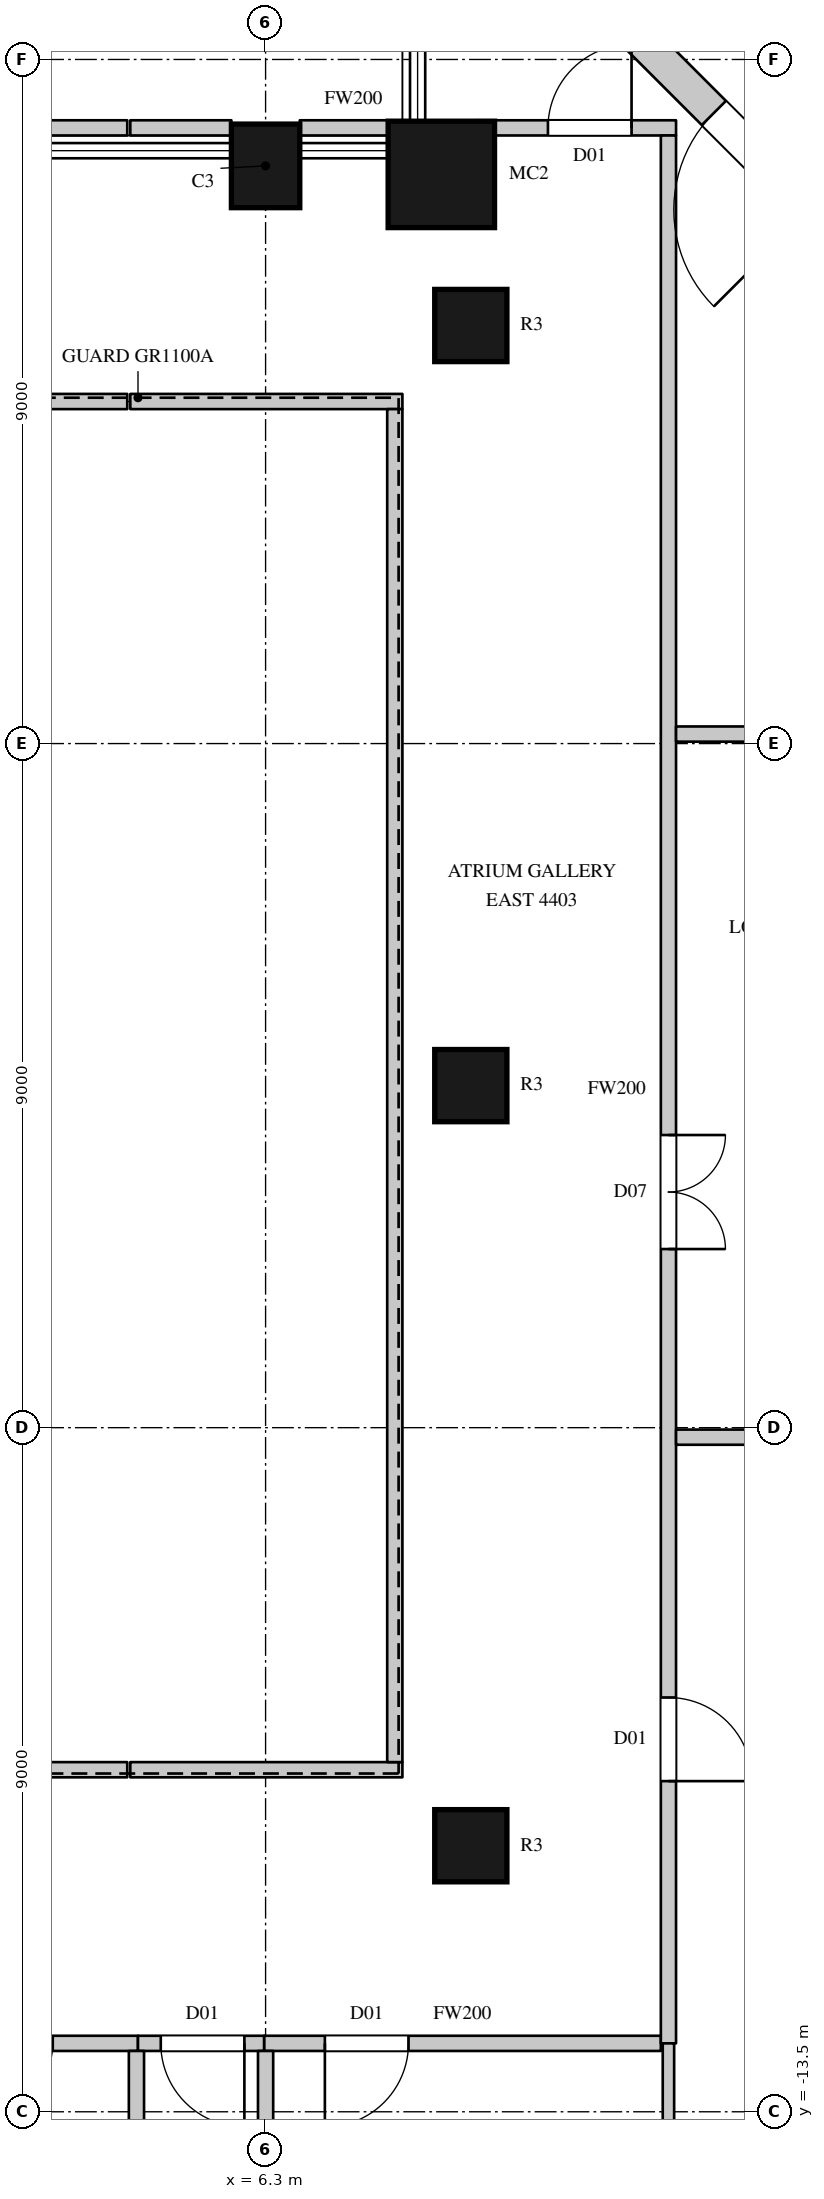
"""IFC4 building model, lengths in metres.
Left out: names, types, materials, properties, quantities, classifications, styles, units other than length and angle.
Written with IfcOpenShell. Run it as: python <this file> out.ifc"""

import sys

from ifc_helpers import new_model, si_unit, direction, frame, frame_2d, origin, origin_2d, place, context, subcontext, project, spatial, rectangle, circle, extrude, element, fill, save


model = new_model("IFC4")
c1 = context("Model", 3, precision=1e-05, world=origin(), true_north=direction((0.0, 1.0)))
c2 = subcontext(c1, "Body", "Model", "MODEL_VIEW")
j1 = project(units=[si_unit("LENGTHUNIT", "METRE"), si_unit("PLANEANGLEUNIT", "RADIAN")], contexts=[c1])
p1 = place(None, origin())
s1 = spatial("IfcSite", under=j1, at=p1, CompositionType="ELEMENT")
p2 = place(p1, origin())
s2 = spatial("IfcBuilding", under=s1, at=p2, CompositionType="ELEMENT")
p3 = place(p2, frame((0.0, 0.0, 201.5)))
s3 = spatial("IfcBuildingStorey", under=s2, at=p3, CompositionType="ELEMENT", Elevation=201.5)
p4 = place(p3, frame((8.612, 11.988, 0.0), z_axis=(0.0, 0.0, 1.0), x_axis=(1.0, 0.0, 0.0)))
e1 = element("IfcColumn", 1, at=p4, inside=s3, PredefinedType="COLUMN", context=c2, shape_type="SweptSolid", body=[
    extrude(circle(Radius=0.7, at=origin_2d()), origin(), (0.0, 0.0, 1.0), 4.1),
])
p5 = place(p3, frame((6.3, 12.1, 0.0), z_axis=(0.0, 0.0, 1.0), x_axis=(-1.0, 0.0, 0.0)))
e2 = element("IfcColumn", 2, at=p5, inside=s3, PredefinedType="COLUMN", context=c2, shape_type="SweptSolid", body=[
    extrude(rectangle(XDim=0.9, YDim=1.1, at=origin_2d()), origin(), (0.0, 0.0, 1.0), 4.1),
])
for number, where, z_axis, x_axis in (
    (3, (9.0, -10.0, 0.0), (0.0, 0.0, 1.0), (1.0, 0.0, 0.0)),
    (4, (9.0, 0.0, 0.0), (0.0, 0.0, 1.0), (1.0, 0.0, 0.0)),
    (5, (9.0, 10.0, 0.0), (0.0, 0.0, 1.0), (1.0, 0.0, 0.0)),
):
    element("IfcColumn", number, at=place(p3, frame(where, z_axis=z_axis, x_axis=x_axis)), inside=s3, PredefinedType="COLUMN", context=c2, shape_type="SweptSolid", body=[
        extrude(circle(Radius=0.475, at=origin_2d()), origin(), (0.0, 0.0, 1.0), 4.1),
    ])
p6 = place(p3, frame((13.941, 11.053, 0.0), z_axis=(0.0, 0.0, 1.0), x_axis=(-0.707106781187, 0.707106781187, 0.0)))
e6 = element("IfcWall", 6, at=p6, inside=s3, PredefinedType="SOLIDWALL", context=c2, shape_type="SweptSolid", body=[
    extrude(rectangle(XDim=6.505, YDim=0.45, at=frame_2d((3.252, 0.0))), origin(), (0.0, 0.0, 1.0), 3.8),
])
p7 = place(p6, frame((0.665, 0.0, 0.0)))
e7 = element("IfcOpeningElement", 7, at=p7, cuts=e6, PredefinedType="OPENING", context=c2, shape_type="SweptSolid", body=[
    extrude(rectangle(XDim=1.8, YDim=2.4, at=frame_2d((0.9, 1.2))), frame((0.0, 0.235, 0.0), z_axis=(0.0, -1.0, 0.0), x_axis=(1.0, 0.0, 0.0)), (0.0, 0.0, 1.0), 0.47),
])
p8 = place(p3, frame((-10.9, -12.6, 0.0), z_axis=(0.0, 0.0, 1.0), x_axis=(1.0, 0.0, 0.0)))
e8 = element("IfcWall", 8, at=p8, inside=s3, PredefinedType="PARTITIONING", context=c2, shape_type="SweptSolid", body=[
    extrude(rectangle(XDim=15.521, YDim=0.2, at=frame_2d((7.76, 0.0))), origin(), (0.0, 0.0, 1.0), 3.8),
])
p9 = place(p8, frame((0.95, 0.0, 0.0)))
e9 = element("IfcOpeningElement", 9, at=p9, cuts=e8, PredefinedType="OPENING", context=c2, shape_type="SweptSolid", body=[
    extrude(rectangle(XDim=0.9, YDim=2.2, at=frame_2d((0.45, 1.1))), frame((0.0, 0.11, 0.0), z_axis=(0.0, -1.0, 0.0), x_axis=(1.0, 0.0, 0.0)), (0.0, 0.0, 1.0), 0.22),
])
p10 = place(p8, frame((3.95, 0.0, 0.0)))
e10 = element("IfcOpeningElement", 10, at=p10, cuts=e8, PredefinedType="OPENING", context=c2, shape_type="SweptSolid", body=[
    extrude(rectangle(XDim=0.9, YDim=2.2, at=frame_2d((0.45, 1.1))), frame((0.0, 0.11, 0.0), z_axis=(0.0, -1.0, 0.0), x_axis=(1.0, 0.0, 0.0)), (0.0, 0.0, 1.0), 0.22),
])
p11 = place(p8, frame((7.1, 0.0, 0.0)))
e11 = element("IfcOpeningElement", 11, at=p11, cuts=e8, PredefinedType="OPENING", context=c2, shape_type="SweptSolid", body=[
    extrude(rectangle(XDim=0.9, YDim=2.2, at=frame_2d((0.45, 1.1))), frame((0.0, 0.11, 0.0), z_axis=(0.0, -1.0, 0.0), x_axis=(1.0, 0.0, 0.0)), (0.0, 0.0, 1.0), 0.22),
])
p12 = place(p8, frame((10.0, 0.0, 0.0)))
e12 = element("IfcOpeningElement", 12, at=p12, cuts=e8, PredefinedType="OPENING", context=c2, shape_type="SweptSolid", body=[
    extrude(rectangle(XDim=0.9, YDim=2.2, at=frame_2d((0.45, 1.1))), frame((0.0, 0.11, 0.0), z_axis=(0.0, -1.0, 0.0), x_axis=(1.0, 0.0, 0.0)), (0.0, 0.0, 1.0), 0.22),
])
p13 = place(p8, frame((13.5, 0.0, 0.0)))
e13 = element("IfcOpeningElement", 13, at=p13, cuts=e8, PredefinedType="OPENING", context=c2, shape_type="SweptSolid", body=[
    extrude(rectangle(XDim=0.9, YDim=2.2, at=frame_2d((0.45, 1.1))), frame((0.0, 0.11, 0.0), z_axis=(0.0, -1.0, 0.0), x_axis=(1.0, 0.0, 0.0)), (0.0, 0.0, 1.0), 0.22),
])
p14 = place(p3, frame((-2.25, 12.6, 0.0), z_axis=(0.0, 0.0, 1.0), x_axis=(1.0, 0.0, 0.0)))
e14 = element("IfcWall", 14, at=p14, inside=s3, PredefinedType="PARTITIONING", context=c2, shape_type="SweptSolid", body=[
    extrude(rectangle(XDim=6.73, YDim=0.2, at=frame_2d((3.365, 0.0))), origin(), (0.0, 0.0, 1.0), 3.8),
])
for number, where, z_axis, x_axis in (
    (15, (-6.1, -9.0, 0.0), (0.0, 0.0, 1.0), (1.0, 0.0, 0.0)),
    (16, (-6.1, 9.0, 0.0), (0.0, 0.0, 1.0), (1.0, 0.0, 0.0)),
):
    element("IfcWall", number, at=place(p3, frame(where, z_axis=z_axis, x_axis=x_axis)), inside=s3, PredefinedType="PARTITIONING", context=c2, shape_type="SweptSolid", body=[
        extrude(rectangle(XDim=10.58, YDim=0.2, at=frame_2d((5.29, 0.0))), origin(), (0.0, 0.0, 1.0), 3.8),
    ])
for number, where, z_axis, x_axis in (
    (17, (4.52, -9.0, 0.0), (0.0, 0.0, 1.0), (1.0, 0.0, 0.0)),
    (18, (4.52, 9.0, 0.0), (0.0, 0.0, 1.0), (1.0, 0.0, 0.0)),
):
    element("IfcWall", number, at=place(p3, frame(where, z_axis=z_axis, x_axis=x_axis)), inside=s3, PredefinedType="PARTITIONING", context=c2, shape_type="SweptSolid", body=[
        extrude(rectangle(XDim=3.58, YDim=0.2, at=frame_2d((1.79, 0.0))), origin(), (0.0, 0.0, 1.0), 3.8),
    ])
p15 = place(p3, frame((4.52, 12.6, 0.0), z_axis=(0.0, 0.0, 1.0), x_axis=(1.0, 0.0, 0.0)))
e19 = element("IfcWall", 19, at=p15, inside=s3, PredefinedType="PARTITIONING", context=c2, shape_type="SweptSolid", body=[
    extrude(rectangle(XDim=1.33, YDim=0.2, at=frame_2d((0.665, 0.0))), origin(), (0.0, 0.0, 1.0), 3.8),
])
p16 = place(p3, frame((6.75, 12.6, 0.0), z_axis=(0.0, 0.0, 1.0), x_axis=(1.0, 0.0, 0.0)))
e20 = element("IfcWall", 20, at=p16, inside=s3, PredefinedType="PARTITIONING", context=c2, shape_type="SweptSolid", body=[
    extrude(rectangle(XDim=1.41, YDim=0.2, at=frame_2d((0.705, 0.0))), origin(), (0.0, 0.0, 1.0), 3.8),
])
p17 = place(p3, frame((6.28, -12.6, 0.0), z_axis=(0.0, 0.0, 1.0), x_axis=(1.0, 0.0, 0.0)))
e21 = element("IfcWall", 21, at=p17, inside=s3, PredefinedType="PARTITIONING", context=c2, shape_type="SweptSolid", body=[
    extrude(rectangle(XDim=5.22, YDim=0.2, at=frame_2d((2.61, 0.0))), origin(), (0.0, 0.0, 1.0), 3.8),
])
p18 = place(p17, frame((0.8, 0.0, 0.0)))
e22 = element("IfcOpeningElement", 22, at=p18, cuts=e21, PredefinedType="OPENING", context=c2, shape_type="SweptSolid", body=[
    extrude(rectangle(XDim=1.1, YDim=2.4, at=frame_2d((0.55, 1.2))), frame((0.0, 0.11, 0.0), z_axis=(0.0, -1.0, 0.0), x_axis=(1.0, 0.0, 0.0)), (0.0, 0.0, 1.0), 0.22),
])
p19 = place(p3, frame((8.0, -8.9, 0.0), z_axis=(0.0, 0.0, 1.0), x_axis=(0.0, 1.0, 0.0)))
e23 = element("IfcWall", 23, at=p19, inside=s3, PredefinedType="PARTITIONING", context=c2, shape_type="SweptSolid", body=[
    extrude(rectangle(XDim=17.8, YDim=0.2, at=frame_2d((8.9, 0.0))), origin(), (0.0, 0.0, 1.0), 3.8),
])
p20 = place(p3, frame((9.065, 12.6, 0.0), z_axis=(0.0, 0.0, 1.0), x_axis=(1.0, 0.0, 0.0)))
e24 = element("IfcWall", 24, at=p20, inside=s3, PredefinedType="PARTITIONING", context=c2, shape_type="SweptSolid", body=[
    extrude(rectangle(XDim=2.635, YDim=0.2, at=frame_2d((1.318, 0.0))), origin(), (0.0, 0.0, 1.0), 3.8),
])
p21 = place(p20, frame((0.95, 0.0, 0.0)))
e25 = element("IfcOpeningElement", 25, at=p21, cuts=e24, PredefinedType="OPENING", context=c2, shape_type="SweptSolid", body=[
    extrude(rectangle(XDim=1.1, YDim=2.4, at=frame_2d((0.55, 1.2))), frame((0.0, 0.11, 0.0), z_axis=(0.0, -1.0, 0.0), x_axis=(1.0, 0.0, 0.0)), (0.0, 0.0, 1.0), 0.22),
])
p22 = place(p3, frame((11.6, -12.6, 0.0), z_axis=(0.0, 0.0, 1.0), x_axis=(0.0, 1.0, 0.0)))
e26 = element("IfcWall", 26, at=p22, inside=s3, PredefinedType="PARTITIONING", context=c2, shape_type="SweptSolid", body=[
    extrude(rectangle(XDim=25.1, YDim=0.2, at=frame_2d((12.55, 0.0))), origin(), (0.0, 0.0, 1.0), 3.8),
])
p23 = place(p22, frame((10.45, 0.0, 0.0)))
e27 = element("IfcOpeningElement", 27, at=p23, cuts=e26, PredefinedType="OPENING", context=c2, shape_type="SweptSolid", body=[
    extrude(rectangle(XDim=1.5, YDim=2.4, at=frame_2d((0.75, 1.2))), frame((0.0, 0.11, 0.0), z_axis=(0.0, -1.0, 0.0), x_axis=(1.0, 0.0, 0.0)), (0.0, 0.0, 1.0), 0.22),
])
p24 = place(p22, frame((3.45, 0.0, 0.0)))
e28 = element("IfcOpeningElement", 28, at=p24, cuts=e26, PredefinedType="OPENING", context=c2, shape_type="SweptSolid", body=[
    extrude(rectangle(XDim=1.1, YDim=2.4, at=frame_2d((0.55, 1.2))), frame((0.0, 0.11, 0.0), z_axis=(0.0, -1.0, 0.0), x_axis=(1.0, 0.0, 0.0)), (0.0, 0.0, 1.0), 0.22),
])
for number, where, z_axis, x_axis in (
    (29, (11.7, -4.625, 0.0), (0.0, 0.0, 1.0), (1.0, 0.0, 0.0)),
    (30, (11.7, 4.625, 0.0), (0.0, 0.0, 1.0), (1.0, 0.0, 0.0)),
):
    element("IfcWall", number, at=place(p3, frame(where, z_axis=z_axis, x_axis=x_axis)), inside=s3, PredefinedType="PARTITIONING", context=c2, shape_type="SweptSolid", body=[
        extrude(rectangle(XDim=2.975, YDim=0.2, at=frame_2d((1.488, 0.0))), origin(), (0.0, 0.0, 1.0), 3.8),
    ])
p25 = place(p3, frame((11.6, -16.7, 0.0), z_axis=(0.0, 0.0, 1.0), x_axis=(0.0, 1.0, 0.0)))
e31 = element("IfcWall", 31, at=p25, inside=s3, PredefinedType="PARTITIONING", context=c2, shape_type="SweptSolid", body=[
    extrude(rectangle(XDim=4.1, YDim=0.15, at=frame_2d((2.05, 0.0))), origin(), (0.0, 0.0, 1.0), 3.8),
])
p26 = place(p3, frame((4.621, -12.6, 0.0), z_axis=(0.0, 0.0, 1.0), x_axis=(1.0, 0.0, 0.0)))
e32 = element("IfcWall", 32, at=p26, inside=s3, PredefinedType="PARTITIONING", context=c2, shape_type="SweptSolid", body=[
    extrude(rectangle(XDim=1.659, YDim=0.2, at=frame_2d((0.83, 0.0))), origin(), (0.0, 0.0, 1.0), 3.8),
])
p27 = place(p26, frame((0.3, 0.0, 0.0)))
e33 = element("IfcOpeningElement", 33, at=p27, cuts=e32, PredefinedType="OPENING", context=c2, shape_type="SweptSolid", body=[
    extrude(rectangle(XDim=1.1, YDim=2.4, at=frame_2d((0.55, 1.2))), frame((0.0, 0.11, 0.0), z_axis=(0.0, -1.0, 0.0), x_axis=(1.0, 0.0, 0.0)), (0.0, 0.0, 1.0), 0.22),
])
p28 = place(p3, frame((4.601, -16.7, 0.0), z_axis=(0.0, 0.0, 1.0), x_axis=(0.0, 1.0, 0.0)))
e34 = element("IfcWall", 34, at=p28, inside=s3, PredefinedType="PARTITIONING", context=c2, shape_type="SweptSolid", body=[
    extrude(rectangle(XDim=4.0, YDim=0.2, at=frame_2d((2.0, 0.0))), origin(), (0.0, 0.0, 1.0), 3.8),
])
p29 = place(p3, frame((6.3, -16.05, 0.0), z_axis=(0.0, 0.0, 1.0), x_axis=(0.0, 1.0, 0.0)))
e35 = element("IfcWall", 35, at=p29, inside=s3, PredefinedType="PARTITIONING", context=c2, shape_type="SweptSolid", body=[
    extrude(rectangle(XDim=3.35, YDim=0.2, at=frame_2d((1.675, 0.0))), origin(), (0.0, 0.0, 1.0), 3.25),
])
p30 = place(p7, origin())
e36 = element("IfcDoor", 36, at=p30, inside=s3, OperationType="SLIDING_TO_LEFT", PredefinedType="DOOR", context=c2, shape_type="SweptSolid", body=[
    extrude(rectangle(XDim=1.8, YDim=2.4, at=frame_2d((0.9, 1.2))), frame((0.0, 0.13, 0.0), z_axis=(0.0, -1.0, 0.0), x_axis=(1.0, 0.0, 0.0)), (0.0, 0.0, 1.0), 0.05),
])
fill(e7, e36)
p31 = place(p23, origin())
e37 = element("IfcDoor", 37, at=p31, inside=s3, OperationType="DOUBLE_DOOR_SINGLE_SWING", PredefinedType="DOOR", context=c2, shape_type="SweptSolid", body=[
    extrude(rectangle(XDim=1.5, YDim=2.4, at=frame_2d((0.75, 1.2))), frame((0.0, 0.025, 0.0), z_axis=(0.0, -1.0, 0.0), x_axis=(1.0, 0.0, 0.0)), (0.0, 0.0, 1.0), 0.05),
])
fill(e27, e37)
p32 = place(p27, origin())
e38 = element("IfcDoor", 38, at=p32, inside=s3, OperationType="SINGLE_SWING_LEFT", PredefinedType="DOOR", context=c2, shape_type="SweptSolid", body=[
    extrude(rectangle(XDim=1.1, YDim=2.4, at=frame_2d((0.55, 1.2))), frame((0.0, 0.025, 0.0), z_axis=(0.0, -1.0, 0.0), x_axis=(1.0, 0.0, 0.0)), (0.0, 0.0, 1.0), 0.05),
])
fill(e33, e38)
p33 = place(p18, origin())
e39 = element("IfcDoor", 39, at=p33, inside=s3, OperationType="SINGLE_SWING_RIGHT", PredefinedType="DOOR", context=c2, shape_type="SweptSolid", body=[
    extrude(rectangle(XDim=1.1, YDim=2.4, at=frame_2d((0.55, 1.2))), frame((0.0, 0.025, 0.0), z_axis=(0.0, -1.0, 0.0), x_axis=(1.0, 0.0, 0.0)), (0.0, 0.0, 1.0), 0.05),
])
fill(e22, e39)
p34 = place(p21, origin())
e40 = element("IfcDoor", 40, at=p34, inside=s3, OperationType="SINGLE_SWING_RIGHT", PredefinedType="DOOR", context=c2, shape_type="SweptSolid", body=[
    extrude(rectangle(XDim=1.1, YDim=2.4, at=frame_2d((0.55, 1.2))), frame((0.0, 0.025, 0.0), z_axis=(0.0, -1.0, 0.0), x_axis=(1.0, 0.0, 0.0)), (0.0, 0.0, 1.0), 0.05),
])
fill(e25, e40)
p35 = place(p24, origin())
e41 = element("IfcDoor", 41, at=p35, inside=s3, OperationType="SINGLE_SWING_RIGHT", PredefinedType="DOOR", context=c2, shape_type="SweptSolid", body=[
    extrude(rectangle(XDim=1.1, YDim=2.4, at=frame_2d((0.55, 1.2))), frame((0.0, 0.025, 0.0), z_axis=(0.0, -1.0, 0.0), x_axis=(1.0, 0.0, 0.0)), (0.0, 0.0, 1.0), 0.05),
])
fill(e28, e41)
save(model, sys.argv[1])
